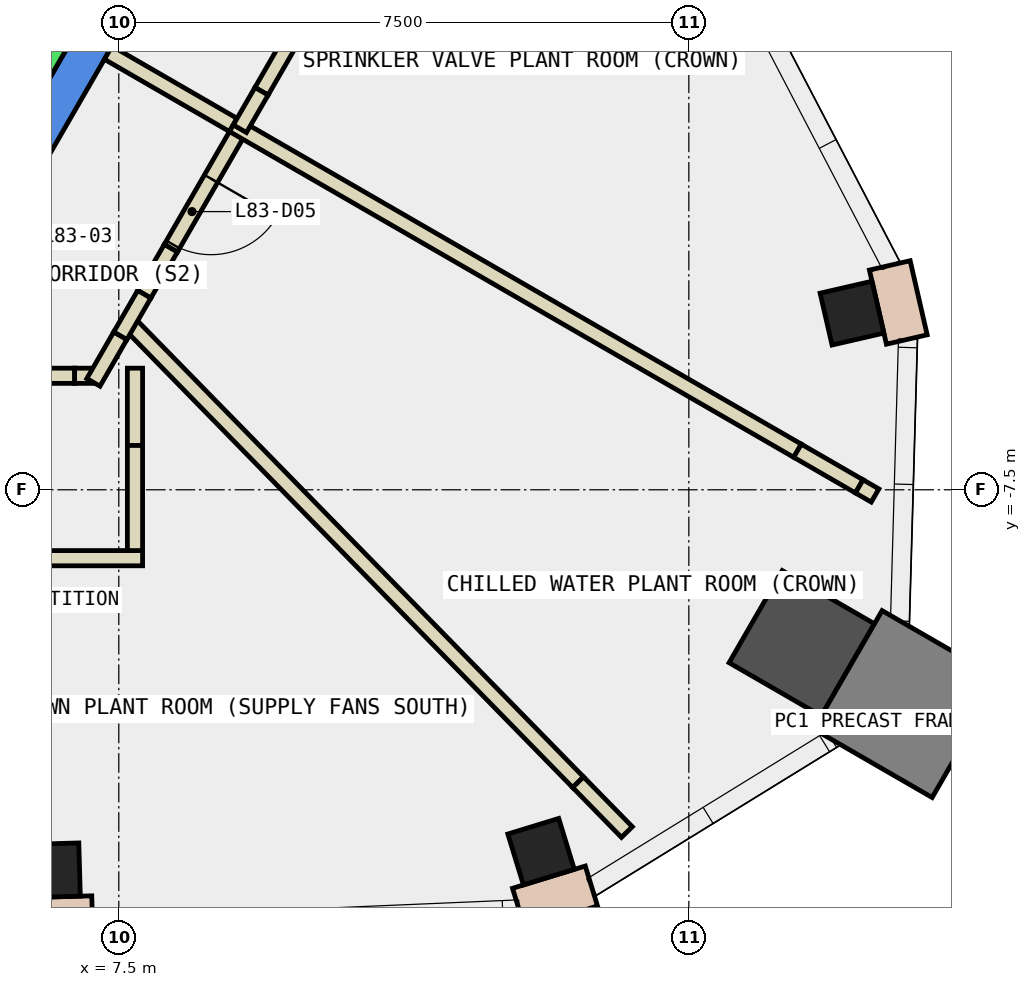
"""IFC4 building model, lengths in metres.
Left out: names, types, materials, properties, quantities, classifications, styles, units other than length and angle.
Written with IfcOpenShell. Run it as: python <this file> out.ifc"""

import sys

from ifc_helpers import new_model, si_unit, direction, frame, frame_2d, origin, origin_2d, place, context, subcontext, project, spatial, polyline, rectangle, outline, extrude, element, fill, save


model = new_model("IFC4")
c1 = context("Model", 3, precision=1e-05, world=origin(), true_north=direction((0.0, 1.0)))
c2 = subcontext(c1, "Body", "Model", "MODEL_VIEW")
j1 = project(units=[si_unit("LENGTHUNIT", "METRE"), si_unit("PLANEANGLEUNIT", "RADIAN")], contexts=[c1])
p1 = place(None, origin())
s1 = spatial("IfcSite", under=j1, at=p1, CompositionType="ELEMENT")
p2 = place(p1, origin())
s2 = spatial("IfcBuilding", under=s1, at=p2, CompositionType="ELEMENT")
p3 = place(p2, frame((0.0, 0.0, 353.9)))
s3 = spatial("IfcBuildingStorey", under=s2, at=p3, CompositionType="ELEMENT", Elevation=353.9)
for number, where, z_axis, x_axis in (
    (1, (6.634, -12.506, -0.35), (0.0, 0.0, 1.0), (1.0, 0.028, 0.0)),
    (2, (13.056, -12.261, -0.35), (0.0, 0.0, 1.0), (0.956, 0.293, 0.0)),
):
    element("IfcColumn", number, at=place(p3, frame(where, z_axis=z_axis, x_axis=x_axis)), inside=s3, PredefinedType="COLUMN", context=c2, shape_type="SweptSolid", body=[
        extrude(rectangle(XDim=0.7, YDim=0.7, at=origin_2d()), origin(), (0.0, 0.0, 1.0), 4.4),
    ])
p4 = place(p3, frame((16.486, -9.519, -0.35), z_axis=(0.0, 0.0, 1.0), x_axis=(-0.866025403784, 0.5, 0.0)))
e3 = element("IfcColumn", 3, at=p4, inside=s3, PredefinedType="COLUMN", context=c2, shape_type="SweptSolid", body=[
    extrude(rectangle(XDim=1.4, YDim=1.4, at=origin_2d()), origin(), (0.0, 0.0, 1.0), 4.4),
])
p5 = place(p3, frame((17.147, -5.176, -0.35), z_axis=(0.0, 0.0, 1.0), x_axis=(-0.224406828383, 0.974495549182, 0.0)))
e4 = element("IfcColumn", 4, at=p5, inside=s3, PredefinedType="COLUMN", context=c2, shape_type="SweptSolid", body=[
    extrude(rectangle(XDim=0.7, YDim=0.7, at=origin_2d()), origin(), (0.0, 0.0, 1.0), 4.4),
])
p6 = place(p3, frame((17.872, -10.319, -0.35), z_axis=(0.0, 0.0, 1.0), x_axis=(-0.866025403784, 0.5, 0.0)))
e5 = element("IfcColumn", 5, at=p6, inside=s3, PredefinedType="COLUMN", context=c2, shape_type="SweptSolid", body=[
    extrude(rectangle(XDim=1.8, YDim=1.8, at=origin_2d()), origin(), (0.0, 0.0, 1.0), 4.4),
])
p7 = place(p3, frame((0.0, 0.0, -0.35)))
e6 = element("IfcWall", 6, at=p7, inside=s3, PredefinedType="SHEAR", context=c2, shape_type="SweptSolid", body=[
    extrude(outline(polyline([(4.907, -6.0), (9.815, 2.5), (9.238, 2.5), (4.619, -5.5), (4.907, -6.0)])), origin(), (0.0, 0.0, 1.0), 4.4),
])
p8 = place(p3, frame((17.868, -5.523, 0.0), z_axis=(0.0, 0.0, 1.0), x_axis=(-0.223825449309, 0.974629246556, 0.0)))
e7 = element("IfcWall", 7, at=p8, inside=s3, PredefinedType="STANDARD", context=c2, shape_type="SweptSolid", body=[
    extrude(rectangle(XDim=1.0, YDim=0.55, at=frame_2d((0.5, 0.0))), origin(), (0.0, 0.0, 1.0), 4.05),
])
p9 = place(p3, frame((6.152, -13.145, 0.0), z_axis=(0.0, 0.0, 1.0), x_axis=(0.999606097148, 0.028065112591, 0.0)))
e8 = element("IfcWall", 8, at=p9, inside=s3, PredefinedType="STANDARD", context=c2, shape_type="SweptSolid", body=[
    extrude(rectangle(XDim=1.0, YDim=0.55, at=frame_2d((0.5, 0.0))), origin(), (0.0, 0.0, 1.0), 4.05),
])
p10 = place(p3, frame((12.761, -13.006, 0.0), z_axis=(0.0, 0.0, 1.0), x_axis=(0.95613166039, 0.292937276563, 0.0)))
e9 = element("IfcWall", 9, at=p10, inside=s3, PredefinedType="STANDARD", context=c2, shape_type="SweptSolid", body=[
    extrude(rectangle(XDim=1.001, YDim=0.55, at=frame_2d((0.5, 0.0))), origin(), (0.0, 0.0, 1.0), 4.05),
])
p11 = place(p3, frame((7.813, -8.4, 0.0), z_axis=(0.0, 0.0, 1.0), x_axis=(-1.0, 0.0, 0.0)))
e10 = element("IfcWall", 10, at=p11, inside=s3, PredefinedType="PARTITIONING", context=c2, shape_type="SweptSolid", body=[
    extrude(rectangle(XDim=2.598, YDim=0.2, at=frame_2d((1.299, 0.0))), origin(), (0.0, 0.0, 1.0), 4.05),
])
p12 = place(p11, frame((1.536, 0.0, 0.0)))
e11 = element("IfcOpeningElement", 11, at=p12, cuts=e10, PredefinedType="OPENING", context=c2, shape_type="SweptSolid", body=[
    extrude(rectangle(XDim=1.0, YDim=2.1, at=frame_2d((0.5, 1.05))), frame((0.0, 0.11, 0.0), z_axis=(0.0, -1.0, 0.0), x_axis=(1.0, 0.0, 0.0)), (0.0, 0.0, 1.0), 0.22),
])
p13 = place(p3, frame((7.713, -5.9, 0.0), z_axis=(0.0, 0.0, 1.0), x_axis=(0.0, -1.0, 0.0)))
e12 = element("IfcWall", 12, at=p13, inside=s3, PredefinedType="PARTITIONING", context=c2, shape_type="SweptSolid", body=[
    extrude(rectangle(XDim=1.017, YDim=0.2, at=frame_2d((0.509, 0.0))), origin(), (0.0, 0.0, 1.0), 1.95),
])
p14 = place(p3, frame((9.093, -2.75, 0.0), z_axis=(0.0, 0.0, 1.0), x_axis=(-0.500145398563, -0.865941441609, 0.0)))
e13 = element("IfcWall", 13, at=p14, inside=s3, PredefinedType="PARTITIONING", context=c2, shape_type="SweptSolid", body=[
    extrude(rectangle(XDim=1.815, YDim=0.2, at=frame_2d((0.908, 0.0))), origin(), (0.0, 0.0, 1.0), 4.05),
])
p15 = place(p14, frame((0.759, 0.0, 0.0)))
e14 = element("IfcOpeningElement", 14, at=p15, cuts=e13, PredefinedType="OPENING", context=c2, shape_type="SweptSolid", body=[
    extrude(rectangle(XDim=1.0, YDim=2.1, at=frame_2d((0.5, 1.05))), frame((0.0, 0.11, 0.0), z_axis=(0.0, -1.0, 0.0), x_axis=(1.0, 0.0, 0.0)), (0.0, 0.0, 1.0), 0.22),
])
p16 = place(p3, frame((7.361, -1.75, 0.0), z_axis=(0.0, 0.0, 1.0), x_axis=(0.865980106173, -0.500078449558, 0.0)))
e15 = element("IfcWall", 15, at=p16, inside=s3, PredefinedType="PARTITIONING", context=c2, shape_type="SweptSolid", body=[
    extrude(rectangle(XDim=1.9, YDim=0.2, at=frame_2d((0.95, 0.0))), origin(), (0.0, 0.0, 1.0), 4.05),
])
p17 = place(p3, frame((7.624, -5.295, 0.0), z_axis=(0.0, 0.0, 1.0), x_axis=(0.699204125851, -0.714922086938, 0.0)))
e16 = element("IfcWall", 16, at=p17, inside=s3, PredefinedType="PARTITIONING", context=c2, shape_type="SweptSolid", body=[
    extrude(rectangle(XDim=8.465, YDim=0.2, at=frame_2d((4.233, 0.0))), origin(), (0.0, 0.0, 1.0), 4.05),
])
p18 = place(p3, frame((9.006, -2.7, 0.0), z_axis=(0.0, 0.0, 1.0), x_axis=(0.866026229868, -0.499998569178, 0.0)))
e17 = element("IfcWall", 17, at=p18, inside=s3, PredefinedType="PARTITIONING", context=c2, shape_type="SweptSolid", body=[
    extrude(rectangle(XDim=8.572, YDim=0.2, at=frame_2d((4.286, 0.0))), origin(), (0.0, 0.0, 1.0), 4.05),
])
p19 = place(p3, frame((5.076, -6.0, 0.0), z_axis=(0.0, 0.0, 1.0), x_axis=(1.0, 0.0, 0.0)))
e18 = element("IfcWall", 18, at=p19, inside=s3, PredefinedType="PARTITIONING", context=c2, shape_type="SweptSolid", body=[
    extrude(rectangle(XDim=1.843, YDim=0.2, at=frame_2d((0.921, 0.0))), origin(), (0.0, 0.0, 1.0), 4.05),
])
p20 = place(p19, frame((0.336, 0.0, 0.0)))
e19 = element("IfcOpeningElement", 19, at=p20, cuts=e18, PredefinedType="OPENING", context=c2, shape_type="SweptSolid", body=[
    extrude(rectangle(XDim=1.0, YDim=2.1, at=frame_2d((0.5, 1.05))), frame((0.0, 0.11, 0.0), z_axis=(0.0, -1.0, 0.0), x_axis=(1.0, 0.0, 0.0)), (0.0, 0.0, 1.0), 0.22),
])
p21 = place(p3, frame((6.919, -6.0, 0.0), z_axis=(0.0, 0.0, 1.0), x_axis=(1.0, 0.0, 0.0)))
e20 = element("IfcWall", 20, at=p21, inside=s3, PredefinedType="PARTITIONING", context=c2, shape_type="SweptSolid", body=[
    extrude(rectangle(XDim=0.242, YDim=0.2, at=frame_2d((0.121, 0.0))), origin(), (0.0, 0.0, 1.0), 1.95),
])
p22 = place(p3, frame((7.713, -6.917, 0.0), z_axis=(0.0, 0.0, 1.0), x_axis=(0.0, -1.0, 0.0)))
e21 = element("IfcWall", 21, at=p22, inside=s3, PredefinedType="PARTITIONING", context=c2, shape_type="SweptSolid", body=[
    extrude(rectangle(XDim=1.383, YDim=0.2, at=frame_2d((0.691, 0.0))), origin(), (0.0, 0.0, 1.0), 4.05),
])
p23 = place(p3, frame((8.185, -4.322, 0.0), z_axis=(0.0, 0.0, 1.0), x_axis=(-0.500265973451, -0.865871789474, 0.0)))
e22 = element("IfcWall", 22, at=p23, inside=s3, PredefinedType="PARTITIONING", context=c2, shape_type="SweptSolid", body=[
    extrude(rectangle(XDim=0.7, YDim=0.2, at=frame_2d((0.35, 0.0))), origin(), (0.0, 0.0, 1.0), 1.95),
])
p24 = place(p3, frame((7.835, -4.928, 0.0), z_axis=(0.0, 0.0, 1.0), x_axis=(-0.500045805297, -0.865998956469, 0.0)))
e23 = element("IfcWall", 23, at=p24, inside=s3, PredefinedType="PARTITIONING", context=c2, shape_type="SweptSolid", body=[
    extrude(rectangle(XDim=0.632, YDim=0.2, at=frame_2d((0.316, 0.0))), origin(), (0.0, 0.0, 1.0), 4.05),
])
p25 = place(p3, frame((7.519, -5.475, 0.0), z_axis=(0.0, 0.0, 1.0), x_axis=(-0.499782295163, -0.866151059251, 0.0)))
e24 = element("IfcWall", 24, at=p25, inside=s3, PredefinedType="PARTITIONING", context=c2, shape_type="SweptSolid", body=[
    extrude(rectangle(XDim=0.706, YDim=0.2, at=frame_2d((0.353, 0.0))), origin(), (0.0, 0.0, 1.0), 1.95),
])
p26 = place(p3, frame((13.543, -11.347, 0.0), z_axis=(0.0, 0.0, 1.0), x_axis=(0.699486169187, -0.714646135592, 0.0)))
e25 = element("IfcWall", 25, at=p26, inside=s3, PredefinedType="PARTITIONING", context=c2, shape_type="SweptSolid", body=[
    extrude(rectangle(XDim=0.918, YDim=0.2, at=frame_2d((0.459, 0.0))), origin(), (0.0, 0.0, 1.0), 1.95),
])
p27 = place(p3, frame((16.43, -6.986, 0.0), z_axis=(0.0, 0.0, 1.0), x_axis=(0.865942754999, -0.50014312458, 0.0)))
e26 = element("IfcWall", 26, at=p27, inside=s3, PredefinedType="PARTITIONING", context=c2, shape_type="SweptSolid", body=[
    extrude(rectangle(XDim=0.938, YDim=0.2, at=frame_2d((0.469, 0.0))), origin(), (0.0, 0.0, 1.0), 1.95),
])
p28 = place(p3, frame((17.242, -7.455, 0.0), z_axis=(0.0, 0.0, 1.0), x_axis=(0.866422508423, -0.499311562953, 0.0)))
e27 = element("IfcWall", 27, at=p28, inside=s3, PredefinedType="PARTITIONING", context=c2, shape_type="SweptSolid", body=[
    extrude(rectangle(XDim=0.24, YDim=0.2, at=frame_2d((0.12, 0.0))), origin(), (0.0, 0.0, 1.0), 4.05),
])
p29 = place(p3, frame((9.738, -1.633, 0.0), z_axis=(0.0, 0.0, 1.0), x_axis=(-0.499820234884, -0.866129166349, 0.0)))
e28 = element("IfcWall", 28, at=p29, inside=s3, PredefinedType="PARTITIONING", context=c2, shape_type="SweptSolid", body=[
    extrude(rectangle(XDim=0.72, YDim=0.2, at=frame_2d((0.36, 0.0))), origin(), (0.0, 0.0, 1.0), 1.95),
])
p30 = place(p3, frame((9.378, -2.257, 0.0), z_axis=(0.0, 0.0, 1.0), x_axis=(-0.500427620203, -0.86577837634, 0.0)))
e29 = element("IfcWall", 29, at=p30, inside=s3, PredefinedType="PARTITIONING", context=c2, shape_type="SweptSolid", body=[
    extrude(rectangle(XDim=0.569, YDim=0.2, at=frame_2d((0.285, 0.0))), origin(), (0.0, 0.0, 1.0), 4.05),
])
p31 = place(p3, frame((5.492, -3.788, 0.0), z_axis=(0.0, 0.0, 1.0), x_axis=(0.500011755427, 0.866018616679, 0.0)))
e30 = element("IfcWall", 30, at=p31, inside=s3, PredefinedType="STANDARD", context=c2, shape_type="SweptSolid", body=[
    extrude(rectangle(XDim=2.8, YDim=0.2, at=frame_2d((1.4, 0.0))), origin(), (0.0, 0.0, 1.0), 4.05),
])
p32 = place(p15, origin())
e31 = element("IfcDoor", 31, at=p32, inside=s3, OperationType="SINGLE_SWING_LEFT", PredefinedType="DOOR", context=c2, shape_type="SweptSolid", body=[
    extrude(rectangle(XDim=1.0, YDim=2.1, at=frame_2d((0.5, 1.05))), frame((0.0, 0.025, 0.0), z_axis=(0.0, -1.0, 0.0), x_axis=(1.0, 0.0, 0.0)), (0.0, 0.0, 1.0), 0.05),
])
fill(e14, e31)
save(model, sys.argv[1])
